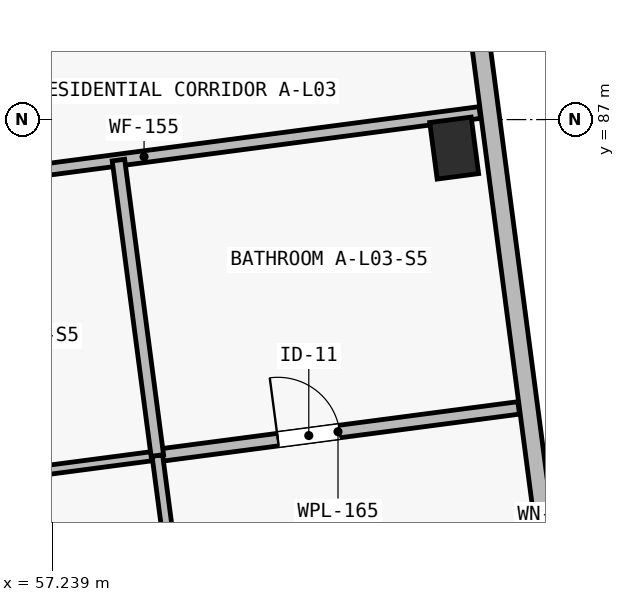
"""IFC4 building model, lengths in metres.
Left out: names, types, materials, properties, quantities, classifications, styles, units other than length and angle.
Written with IfcOpenShell. Run it as: python <this file> out.ifc"""

import sys

from ifc_helpers import new_model, si_unit, direction, frame, frame_2d, origin, origin_2d, place, context, subcontext, project, spatial, rectangle, extrude, element, fill, save


model = new_model("IFC4")
c1 = context("Model", 3, precision=1e-05, world=origin(), true_north=direction((0.0, 1.0)))
c2 = subcontext(c1, "Body", "Model", "MODEL_VIEW")
j1 = project(units=[si_unit("LENGTHUNIT", "METRE"), si_unit("PLANEANGLEUNIT", "RADIAN")], contexts=[c1])
p1 = place(None, origin())
s1 = spatial("IfcSite", under=j1, at=p1, CompositionType="ELEMENT")
p2 = place(p1, origin())
s2 = spatial("IfcBuilding", under=s1, at=p2, CompositionType="ELEMENT")
p3 = place(p2, frame((0.0, 0.0, 11.65)))
s3 = spatial("IfcBuildingStorey", under=s2, at=p3, CompositionType="ELEMENT", Elevation=11.65)
p4 = place(p3, frame((62.53, 86.625, 0.0), z_axis=(0.0, 0.0, 1.0), x_axis=(0.991444861374, 0.13052619222, 0.0)))
e1 = element("IfcColumn", 1, at=p4, inside=s3, PredefinedType="COLUMN", context=c2, shape_type="SweptSolid", body=[
    extrude(rectangle(XDim=0.55, YDim=0.75, at=origin_2d()), origin(), (0.0, 0.0, 1.0), 3.25),
])
p5 = place(p3, frame((61.39, 99.31, 0.0), z_axis=(0.0, 0.0, 1.0), x_axis=(0.13052411616, -0.99144513469, 0.0)))
e2 = element("IfcWall", 2, at=p5, inside=s3, PredefinedType="SOLIDWALL", context=c2, shape_type="SweptSolid", body=[
    extrude(rectangle(XDim=21.05, YDim=0.24, at=frame_2d((10.525, 0.0))), origin(), (0.0, 0.0, 1.0), 3.0),
])
p6 = place(p5, frame((2.99, 0.0, 0.52)))
e3 = element("IfcOpeningElement", 3, at=p6, cuts=e2, PredefinedType="OPENING", context=c2, shape_type="SweptSolid", body=[
    extrude(rectangle(XDim=0.62, YDim=2.28, at=frame_2d((0.31, 1.14))), frame((0.0, 0.135, 0.0), z_axis=(0.0, -1.0, 0.0), x_axis=(1.0, 0.0, 0.0)), (0.0, 0.0, 1.0), 0.27),
])
p7 = place(p5, frame((17.66, 0.0, 0.45)))
e4 = element("IfcOpeningElement", 4, at=p7, cuts=e2, PredefinedType="OPENING", context=c2, shape_type="SweptSolid", body=[
    extrude(rectangle(XDim=0.76, YDim=2.34, at=frame_2d((0.38, 1.17))), frame((0.0, 0.135, 0.0), z_axis=(0.0, -1.0, 0.0), x_axis=(1.0, 0.0, 0.0)), (0.0, 0.0, 1.0), 0.27),
])
p8 = place(p3, frame((54.033, 85.93, 0.0), z_axis=(0.0, 0.0, 1.0), x_axis=(0.991443380249, 0.130537441989, 0.0)))
e5 = element("IfcWall", 5, at=p8, inside=s3, PredefinedType="PARTITIONING", context=c2, shape_type="SweptSolid", body=[
    extrude(rectangle(XDim=8.91, YDim=0.155, at=frame_2d((4.455, 0.0))), origin(), (0.0, 0.0, 1.0), 2.97),
])
p9 = place(p8, frame((1.605, 0.0, 0.0)))
e6 = element("IfcOpeningElement", 6, at=p9, cuts=e5, PredefinedType="OPENING", context=c2, shape_type="SweptSolid", body=[
    extrude(rectangle(XDim=0.98, YDim=2.15, at=frame_2d((0.49, 1.075))), frame((0.0, 0.093, 0.0), z_axis=(0.0, -1.0, 0.0), x_axis=(1.0, 0.0, 0.0)), (0.0, 0.0, 1.0), 0.185),
])
p10 = place(p3, frame((54.376, 82.021, 0.0), z_axis=(0.0, 0.0, 1.0), x_axis=(0.991452356241, 0.130469250419, 0.0)))
e7 = element("IfcWall", 7, at=p10, inside=s3, PredefinedType="PARTITIONING", context=c2, shape_type="SweptSolid", body=[
    extrude(rectangle(XDim=4.285, YDim=0.12, at=frame_2d((2.143, 0.0))), origin(), (0.0, 0.0, 1.0), 2.97),
])
p11 = place(p10, frame((1.825, 0.0, 0.0)))
e8 = element("IfcOpeningElement", 8, at=p11, cuts=e7, PredefinedType="OPENING", context=c2, shape_type="SweptSolid", body=[
    extrude(rectangle(XDim=0.9, YDim=2.1, at=frame_2d((0.45, 1.05))), frame((0.0, 0.075, 0.0), z_axis=(0.0, -1.0, 0.0), x_axis=(1.0, 0.0, 0.0)), (0.0, 0.0, 1.0), 0.15),
])
p12 = place(p3, frame((58.625, 82.581, 0.0), z_axis=(0.0, 0.0, 1.0), x_axis=(0.991441813226, 0.130549343114, 0.0)))
e9 = element("IfcWall", 9, at=p12, inside=s3, PredefinedType="PLUMBINGWALL", context=c2, shape_type="SweptSolid", body=[
    extrude(rectangle(XDim=4.795, YDim=0.165, at=frame_2d((2.397, 0.0))), origin(), (0.0, 0.0, 1.0), 2.97),
])
p13 = place(p12, frame((1.6, 0.0, 0.0)))
e10 = element("IfcOpeningElement", 10, at=p13, cuts=e9, PredefinedType="OPENING", context=c2, shape_type="SweptSolid", body=[
    extrude(rectangle(XDim=0.82, YDim=2.08, at=frame_2d((0.41, 1.04))), frame((0.0, 0.097, 0.0), z_axis=(0.0, -1.0, 0.0), x_axis=(1.0, 0.0, 0.0)), (0.0, 0.0, 1.0), 0.195),
])
p14 = place(p3, frame((59.237, 77.931, 0.0), z_axis=(0.0, 0.0, 1.0), x_axis=(-0.13050972446, 0.991447029256, 0.0)))
e11 = element("IfcWall", 11, at=p14, inside=s3, PredefinedType="PARTITIONING", context=c2, shape_type="SweptSolid", body=[
    extrude(rectangle(XDim=4.69, YDim=0.14, at=frame_2d((2.345, 0.0))), origin(), (0.0, 0.0, 1.0), 2.97),
])
p15 = place(p14, frame((1.35, 0.0, 0.0)))
e12 = element("IfcOpeningElement", 12, at=p15, cuts=e11, PredefinedType="OPENING", context=c2, shape_type="SweptSolid", body=[
    extrude(rectangle(XDim=0.9, YDim=2.1, at=frame_2d((0.45, 1.05))), frame((0.0, 0.085, 0.0), z_axis=(0.0, -1.0, 0.0), x_axis=(1.0, 0.0, 0.0)), (0.0, 0.0, 1.0), 0.17),
])
p16 = place(p3, frame((58.625, 82.581, 0.0), z_axis=(0.0, 0.0, 1.0), x_axis=(-0.130539898676, 0.991443056788, 0.0)))
e13 = element("IfcWall", 13, at=p16, inside=s3, PredefinedType="PLUMBINGWALL", context=c2, shape_type="SweptSolid", body=[
    extrude(rectangle(XDim=3.92, YDim=0.165, at=frame_2d((1.96, 0.0))), origin(), (0.0, 0.0, 1.0), 2.97),
])
p17 = place(p7, origin())
e14 = element("IfcWindow", 14, at=p17, inside=s3, PartitioningType="SINGLE_PANEL", PredefinedType="WINDOW", context=c2, shape_type="SweptSolid", body=[
    extrude(rectangle(XDim=0.76, YDim=2.34, at=frame_2d((0.38, 1.17))), frame((0.0, 0.03, 0.0), z_axis=(0.0, -1.0, 0.0), x_axis=(1.0, 0.0, 0.0)), (0.0, 0.0, 1.0), 0.06),
])
fill(e4, e14)
p18 = place(p13, origin())
e15 = element("IfcDoor", 15, at=p18, inside=s3, OperationType="SINGLE_SWING_LEFT", PredefinedType="DOOR", context=c2, shape_type="SweptSolid", body=[
    extrude(rectangle(XDim=0.82, YDim=2.08, at=frame_2d((0.41, 1.04))), frame((0.0, 0.025, 0.0), z_axis=(0.0, -1.0, 0.0), x_axis=(1.0, 0.0, 0.0)), (0.0, 0.0, 1.0), 0.05),
])
fill(e10, e15)
save(model, sys.argv[1])
